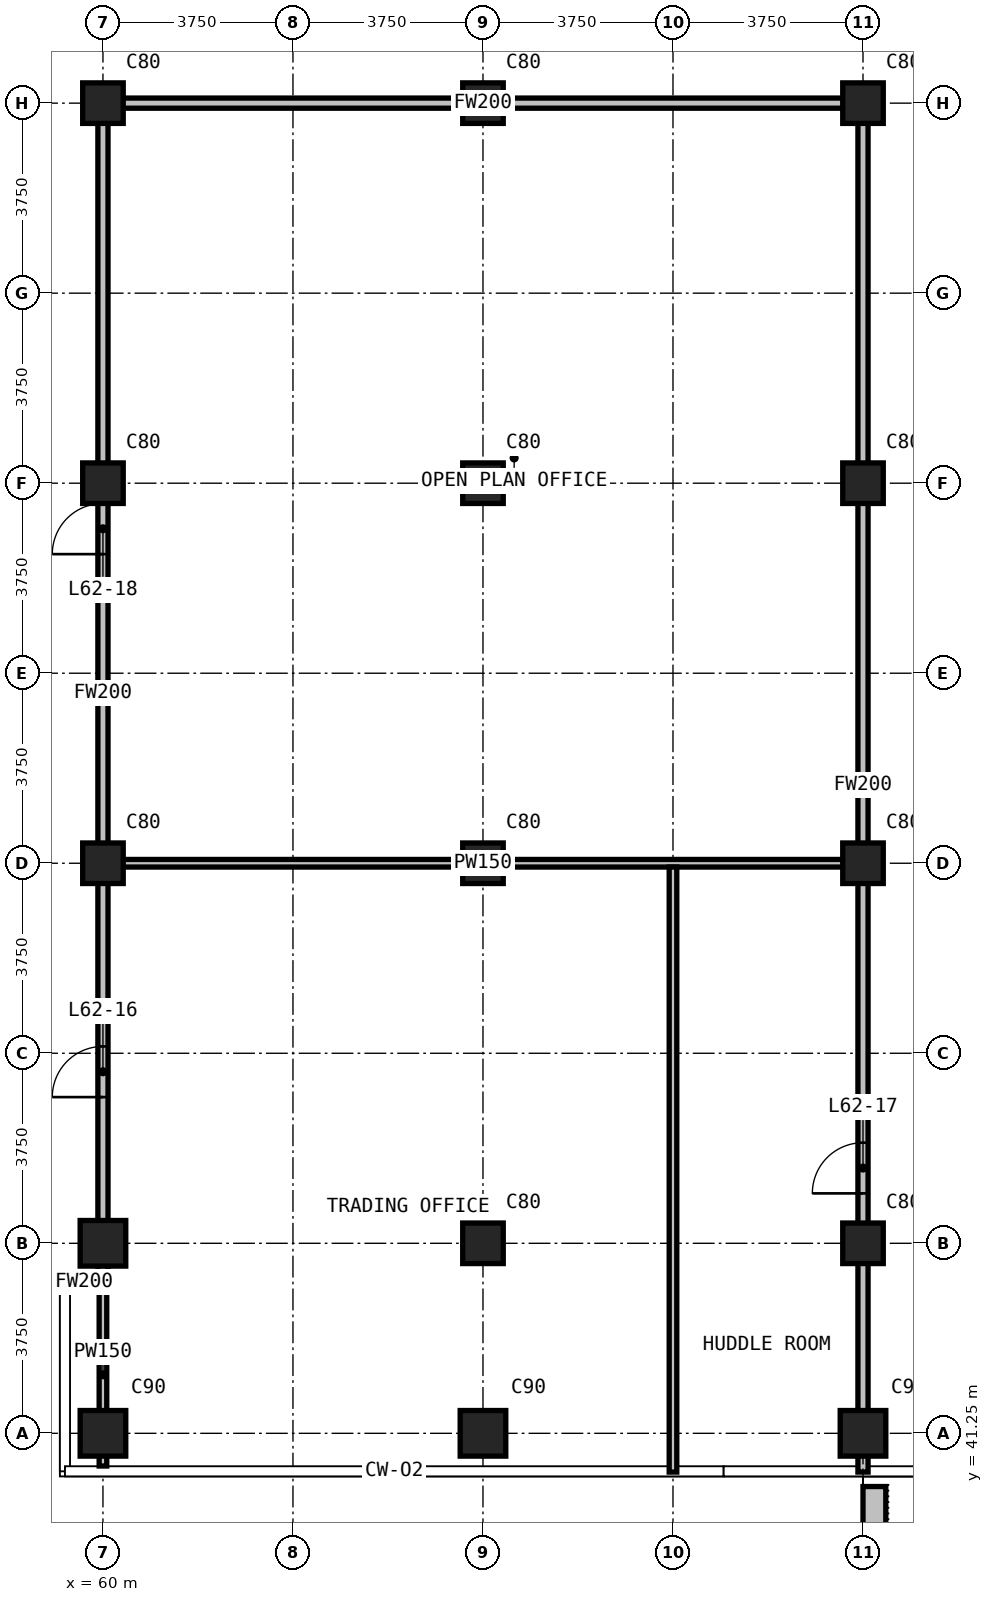
"""IFC4 building model, lengths in metres.
Left out: names, types, materials, properties, quantities, classifications, styles, units other than length and angle.
Written with IfcOpenShell. Run it as: python <this file> out.ifc"""

import sys

from ifc_helpers import new_model, si_unit, direction, frame, frame_2d, origin, origin_2d, place, context, subcontext, project, spatial, rectangle, extrude, element, fill, save


model = new_model("IFC4")
c1 = context("Model", 3, precision=1e-05, world=origin(), true_north=direction((0.0, 1.0)))
c2 = subcontext(c1, "Body", "Model", "MODEL_VIEW")
j1 = project(units=[si_unit("LENGTHUNIT", "METRE"), si_unit("PLANEANGLEUNIT", "RADIAN")], contexts=[c1])
p1 = place(None, origin())
s1 = spatial("IfcSite", under=j1, at=p1, CompositionType="ELEMENT")
p2 = place(p1, origin())
s2 = spatial("IfcBuilding", under=s1, at=p2, CompositionType="ELEMENT")
p3 = place(p2, frame((0.0, 0.0, 239.1)))
s3 = spatial("IfcBuildingStorey", under=s2, at=p3, CompositionType="ELEMENT", Elevation=239.1)
for number, where, z_axis, x_axis in (
    (1, (60.0, 41.25, 0.0), (0.0, 0.0, 1.0), (1.0, 0.0, 0.0)),
    (2, (60.0, 45.0, 0.0), (0.0, 0.0, 1.0), (1.0, 0.0, 0.0)),
):
    element("IfcColumn", number, at=place(p3, frame(where, z_axis=z_axis, x_axis=x_axis)), inside=s3, PredefinedType="COLUMN", context=c2, shape_type="SweptSolid", body=[
        extrude(rectangle(XDim=0.9, YDim=0.9, at=origin_2d()), origin(), (0.0, 0.0, 1.0), 3.6),
    ])
for number, where, z_axis, x_axis in (
    (3, (60.0, 52.5, 0.0), (0.0, 0.0, 1.0), (1.0, 0.0, 0.0)),
    (4, (60.0, 60.0, 0.0), (0.0, 0.0, 1.0), (1.0, 0.0, 0.0)),
    (5, (60.0, 67.5, 0.0), (0.0, 0.0, 1.0), (1.0, 0.0, 0.0)),
):
    element("IfcColumn", number, at=place(p3, frame(where, z_axis=z_axis, x_axis=x_axis)), inside=s3, PredefinedType="COLUMN", context=c2, shape_type="SweptSolid", body=[
        extrude(rectangle(XDim=0.8, YDim=0.8, at=origin_2d()), origin(), (0.0, 0.0, 1.0), 3.6),
    ])
p4 = place(p3, frame((67.5, 41.25, 0.0), z_axis=(0.0, 0.0, 1.0), x_axis=(1.0, 0.0, 0.0)))
e6 = element("IfcColumn", 6, at=p4, inside=s3, PredefinedType="COLUMN", context=c2, shape_type="SweptSolid", body=[
    extrude(rectangle(XDim=0.9, YDim=0.9, at=origin_2d()), origin(), (0.0, 0.0, 1.0), 3.6),
])
for number, where, z_axis, x_axis in (
    (7, (67.5, 45.0, 0.0), (0.0, 0.0, 1.0), (1.0, 0.0, 0.0)),
    (8, (67.5, 52.5, 0.0), (0.0, 0.0, 1.0), (1.0, 0.0, 0.0)),
    (9, (67.5, 60.0, 0.0), (0.0, 0.0, 1.0), (1.0, 0.0, 0.0)),
    (10, (67.5, 67.5, 0.0), (0.0, 0.0, 1.0), (1.0, 0.0, 0.0)),
):
    element("IfcColumn", number, at=place(p3, frame(where, z_axis=z_axis, x_axis=x_axis)), inside=s3, PredefinedType="COLUMN", context=c2, shape_type="SweptSolid", body=[
        extrude(rectangle(XDim=0.8, YDim=0.8, at=origin_2d()), origin(), (0.0, 0.0, 1.0), 3.6),
    ])
p5 = place(p3, frame((75.0, 41.25, 0.0), z_axis=(0.0, 0.0, 1.0), x_axis=(1.0, 0.0, 0.0)))
e11 = element("IfcColumn", 11, at=p5, inside=s3, PredefinedType="COLUMN", context=c2, shape_type="SweptSolid", body=[
    extrude(rectangle(XDim=0.9, YDim=0.9, at=origin_2d()), origin(), (0.0, 0.0, 1.0), 3.6),
])
for number, where, z_axis, x_axis in (
    (12, (75.0, 45.0, 0.0), (0.0, 0.0, 1.0), (1.0, 0.0, 0.0)),
    (13, (75.0, 52.5, 0.0), (0.0, 0.0, 1.0), (1.0, 0.0, 0.0)),
    (14, (75.0, 60.0, 0.0), (0.0, 0.0, 1.0), (1.0, 0.0, 0.0)),
    (15, (75.0, 67.5, 0.0), (0.0, 0.0, 1.0), (1.0, 0.0, 0.0)),
):
    element("IfcColumn", number, at=place(p3, frame(where, z_axis=z_axis, x_axis=x_axis)), inside=s3, PredefinedType="COLUMN", context=c2, shape_type="SweptSolid", body=[
        extrude(rectangle(XDim=0.8, YDim=0.8, at=origin_2d()), origin(), (0.0, 0.0, 1.0), 3.6),
    ])
p6 = place(p3, frame((75.225, 40.2, 0.0), z_axis=(0.0, 0.0, 1.0), x_axis=(0.0, -1.0, 0.0)))
e16 = element("IfcWall", 16, at=p6, inside=s3, PredefinedType="USERDEFINED", context=c2, shape_type="SweptSolid", body=[
    extrude(rectangle(XDim=2.35, YDim=0.45, at=frame_2d((1.175, 0.0))), origin(), (0.0, 0.0, 1.0), 1.1),
])
p7 = place(p3, frame((59.355, 44.235, 0.0), z_axis=(0.0, 0.0, 1.0), x_axis=(1.0, 0.0, 0.0)))
e17 = element("IfcWall", 17, at=p7, inside=s3, PredefinedType="PARTITIONING", context=c2, shape_type="SweptSolid", body=[
    extrude(rectangle(XDim=0.545, YDim=0.2, at=frame_2d((0.272, 0.0))), origin(), (0.0, 0.0, 1.0), 3.3),
])
p8 = place(p3, frame((60.1, 67.5, 0.0), z_axis=(0.0, 0.0, 1.0), x_axis=(1.0, 0.0, 0.0)))
e18 = element("IfcWall", 18, at=p8, inside=s3, PredefinedType="PARTITIONING", context=c2, shape_type="SweptSolid", body=[
    extrude(rectangle(XDim=14.8, YDim=0.2, at=frame_2d((7.4, 0.0))), origin(), (0.0, 0.0, 1.0), 3.3),
])
p9 = place(p3, frame((60.0, 44.135, 0.0), z_axis=(0.0, 0.0, 1.0), x_axis=(0.0, 1.0, 0.0)))
e19 = element("IfcWall", 19, at=p9, inside=s3, PredefinedType="PARTITIONING", context=c2, shape_type="SweptSolid", body=[
    extrude(rectangle(XDim=23.465, YDim=0.2, at=frame_2d((11.732, 0.0))), origin(), (0.0, 0.0, 1.0), 3.3),
])
p10 = place(p9, frame((3.75, 0.0, 0.0)))
e20 = element("IfcOpeningElement", 20, at=p10, cuts=e19, PredefinedType="OPENING", context=c2, shape_type="SweptSolid", body=[
    extrude(rectangle(XDim=1.0, YDim=2.2, at=frame_2d((0.5, 1.1))), frame((0.0, 0.11, 0.0), z_axis=(0.0, -1.0, 0.0), x_axis=(1.0, 0.0, 0.0)), (0.0, 0.0, 1.0), 0.22),
])
p11 = place(p9, frame((14.465, 0.0, 0.0)))
e21 = element("IfcOpeningElement", 21, at=p11, cuts=e19, PredefinedType="OPENING", context=c2, shape_type="SweptSolid", body=[
    extrude(rectangle(XDim=1.0, YDim=2.2, at=frame_2d((0.5, 1.1))), frame((0.0, 0.11, 0.0), z_axis=(0.0, -1.0, 0.0), x_axis=(1.0, 0.0, 0.0)), (0.0, 0.0, 1.0), 0.22),
])
p12 = place(p3, frame((75.0, 40.485, 0.0), z_axis=(0.0, 0.0, 1.0), x_axis=(0.0, 1.0, 0.0)))
e22 = element("IfcWall", 22, at=p12, inside=s3, PredefinedType="PARTITIONING", context=c2, shape_type="SweptSolid", body=[
    extrude(rectangle(XDim=27.115, YDim=0.2, at=frame_2d((13.558, 0.0))), origin(), (0.0, 0.0, 1.0), 3.3),
])
p13 = place(p12, frame((5.5, 0.0, 0.0)))
e23 = element("IfcOpeningElement", 23, at=p13, cuts=e22, PredefinedType="OPENING", context=c2, shape_type="SweptSolid", body=[
    extrude(rectangle(XDim=1.0, YDim=2.2, at=frame_2d((0.5, 1.1))), frame((0.0, 0.11, 0.0), z_axis=(0.0, -1.0, 0.0), x_axis=(1.0, 0.0, 0.0)), (0.0, 0.0, 1.0), 0.22),
])
p14 = place(p3, frame((60.1, 52.5, 0.0), z_axis=(0.0, 0.0, 1.0), x_axis=(1.0, 0.0, 0.0)))
e24 = element("IfcWall", 24, at=p14, inside=s3, PredefinedType="PARTITIONING", context=c2, shape_type="SweptSolid", body=[
    extrude(rectangle(XDim=14.8, YDim=0.15, at=frame_2d((7.4, 0.0))), origin(), (0.0, 0.0, 1.0), 3.3),
])
p15 = place(p3, frame((60.0, 40.605, 0.0), z_axis=(0.0, 0.0, 1.0), x_axis=(0.0, 1.0, 0.0)))
e25 = element("IfcWall", 25, at=p15, inside=s3, PredefinedType="PARTITIONING", context=c2, shape_type="SweptSolid", body=[
    extrude(rectangle(XDim=3.6, YDim=0.15, at=frame_2d((1.8, 0.0))), origin(), (0.0, 0.0, 1.0), 3.3),
])
p16 = place(p3, frame((71.25, 40.485, 0.0), z_axis=(0.0, 0.0, 1.0), x_axis=(0.0, 1.0, 0.0)))
e26 = element("IfcWall", 26, at=p16, inside=s3, PredefinedType="PARTITIONING", context=c2, shape_type="SweptSolid", body=[
    extrude(rectangle(XDim=11.94, YDim=0.15, at=frame_2d((5.97, 0.0))), origin(), (0.0, 0.0, 1.0), 3.3),
])
p17 = place(p10, origin())
e27 = element("IfcDoor", 27, at=p17, inside=s3, OperationType="SINGLE_SWING_RIGHT", PredefinedType="DOOR", context=c2, shape_type="SweptSolid", body=[
    extrude(rectangle(XDim=1.0, YDim=2.2, at=frame_2d((0.5, 1.1))), frame((0.0, 0.025, 0.0), z_axis=(0.0, -1.0, 0.0), x_axis=(1.0, 0.0, 0.0)), (0.0, 0.0, 1.0), 0.05),
])
fill(e20, e27)
p18 = place(p13, origin())
e28 = element("IfcDoor", 28, at=p18, inside=s3, OperationType="SINGLE_SWING_LEFT", PredefinedType="DOOR", context=c2, shape_type="SweptSolid", body=[
    extrude(rectangle(XDim=1.0, YDim=2.2, at=frame_2d((0.5, 1.1))), frame((0.0, 0.025, 0.0), z_axis=(0.0, -1.0, 0.0), x_axis=(1.0, 0.0, 0.0)), (0.0, 0.0, 1.0), 0.05),
])
fill(e23, e28)
p19 = place(p11, origin())
e29 = element("IfcDoor", 29, at=p19, inside=s3, OperationType="SINGLE_SWING_RIGHT", PredefinedType="DOOR", context=c2, shape_type="SweptSolid", body=[
    extrude(rectangle(XDim=1.0, YDim=2.2, at=frame_2d((0.5, 1.1))), frame((0.0, 0.025, 0.0), z_axis=(0.0, -1.0, 0.0), x_axis=(1.0, 0.0, 0.0)), (0.0, 0.0, 1.0), 0.05),
])
fill(e21, e29)
save(model, sys.argv[1])
